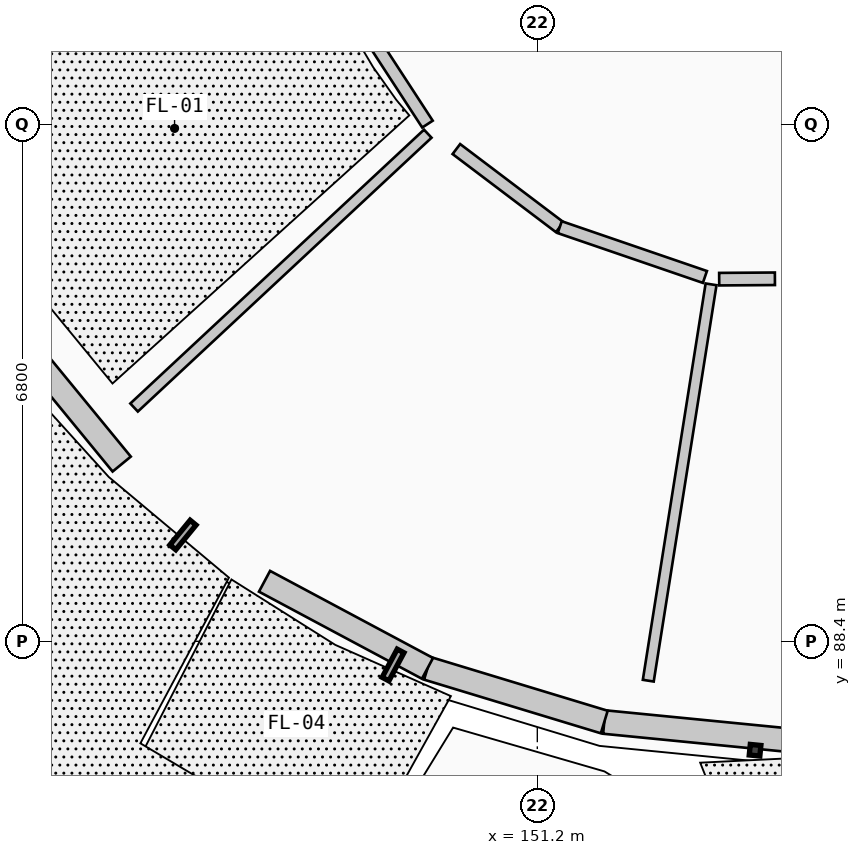
"""IFC4 building model, lengths in metres.
Left out: names, types, materials, properties, quantities, classifications, styles, units other than length and angle.
Written with IfcOpenShell. Run it as: python <this file> out.ifc"""

import sys

from ifc_helpers import new_model, si_unit, direction, frame, frame_2d, origin, origin_2d, place, context, subcontext, project, spatial, rectangle, circle, extrude, element, fill, save


model = new_model("IFC4")
c1 = context("Model", 3, precision=1e-05, world=origin(), true_north=direction((0.0, 1.0)))
c2 = subcontext(c1, "Body", "Model", "MODEL_VIEW")
j1 = project(units=[si_unit("LENGTHUNIT", "METRE"), si_unit("PLANEANGLEUNIT", "RADIAN")], contexts=[c1])
p1 = place(None, origin())
s1 = spatial("IfcSite", under=j1, at=p1, CompositionType="ELEMENT")
p2 = place(p1, origin())
s2 = spatial("IfcBuilding", under=s1, at=p2, CompositionType="ELEMENT")
p3 = place(p2, origin())
s3 = spatial("IfcBuildingStorey", under=s2, at=p3, CompositionType="ELEMENT", Elevation=0.0)
for number, where, z_axis, x_axis in (
    (1, (146.1, 91.1, 0.0), (0.0, 0.0, 1.0), (1.0, 0.0, 0.0)),
    (2, (149.954, 88.524, 0.0), (0.0, 0.0, 1.0), (1.0, 0.0, 0.0)),
    (3, (154.5, 87.62, 0.0), (0.0, 0.0, 1.0), (1.0, 0.0, 0.0)),
):
    element("IfcColumn", number, at=place(p3, frame(where, z_axis=z_axis, x_axis=x_axis)), inside=s3, PredefinedType="PILASTER", context=c2, shape_type="SweptSolid", body=[
        extrude(circle(Radius=0.275, at=origin_2d()), origin(), (0.0, 0.0, 1.0), 4.55),
    ])
for number, where, z_axis, x_axis in (
    (4, (149.975, 94.975, 0.0), (0.0, 0.0, 1.0), (1.0, 0.0, 0.0)),
    (5, (154.5, 93.1, 0.0), (0.0, 0.0, 1.0), (1.0, 0.0, 0.0)),
):
    element("IfcColumn", number, at=place(p3, frame(where, z_axis=z_axis, x_axis=x_axis)), inside=s3, PredefinedType="COLUMN", context=c2, shape_type="SweptSolid", body=[
        extrude(rectangle(XDim=0.365, YDim=0.365, at=origin_2d()), origin(), (0.0, 0.0, 1.0), 4.55),
    ])
p4 = place(p3, frame((150.488, 87.53, 0.0), z_axis=(0.0, 0.0, 1.0), x_axis=(1.0, 0.0, 0.0)))
e6 = element("IfcColumn", 6, at=p4, inside=s3, PredefinedType="PILASTER", context=c2, shape_type="SweptSolid", body=[
    extrude(circle(Radius=0.275, at=origin_2d()), origin(), (0.0, 0.0, 1.0), 4.55),
])
p5 = place(p3, frame((154.5, 87.1, 0.0), z_axis=(0.0, 0.0, 1.0), x_axis=(-0.995202863323, 0.097832820839, 0.0)))
e7 = element("IfcWall", 7, at=p5, inside=s3, PredefinedType="SOLIDWALL", context=c2, shape_type="SweptSolid", body=[
    extrude(rectangle(XDim=2.431, YDim=0.31, at=frame_2d((1.215, 0.0))), origin(), (0.0, 0.0, 1.0), 3.659),
])
p6 = place(p3, frame((152.081, 87.338, 0.0), z_axis=(0.0, 0.0, 1.0), x_axis=(-0.956892539407, 0.290442193951, 0.0)))
e8 = element("IfcWall", 8, at=p6, inside=s3, PredefinedType="SOLIDWALL", context=c2, shape_type="SweptSolid", body=[
    extrude(rectangle(XDim=2.431, YDim=0.31, at=frame_2d((1.215, 0.0))), origin(), (0.0, 0.0, 1.0), 3.659),
])
p7 = place(p3, frame((149.755, 88.044, 0.0), z_axis=(0.0, 0.0, 1.0), x_axis=(-0.881902152415, 0.471432490996, 0.0)))
e9 = element("IfcWall", 9, at=p7, inside=s3, PredefinedType="SOLIDWALL", context=c2, shape_type="SweptSolid", body=[
    extrude(rectangle(XDim=2.431, YDim=0.31, at=frame_2d((1.215, 0.0))), origin(), (0.0, 0.0, 1.0), 3.659),
])
p8 = place(p7, frame((0.516, 0.0, 0.0)))
e10 = element("IfcOpeningElement", 10, at=p8, cuts=e9, PredefinedType="OPENING", context=c2, shape_type="SweptSolid", body=[
    extrude(rectangle(XDim=1.4, YDim=2.3, at=frame_2d((0.7, 1.15))), frame((0.0, 0.165, 0.0), z_axis=(0.0, -1.0, 0.0), x_axis=(1.0, 0.0, 0.0)), (0.0, 0.0, 1.0), 0.33),
])
p9 = place(p3, frame((145.732, 90.732, 0.0), z_axis=(0.0, 0.0, 1.0), x_axis=(-0.634347392822, 0.773048113134, 0.0)))
e11 = element("IfcWall", 11, at=p9, inside=s3, PredefinedType="SOLIDWALL", context=c2, shape_type="SweptSolid", body=[
    extrude(rectangle(XDim=2.431, YDim=0.31, at=frame_2d((1.215, 0.0))), origin(), (0.0, 0.0, 1.0), 3.659),
])
p10 = place(p3, frame((149.759, 95.079, 0.0), z_axis=(0.0, 0.0, 1.0), x_axis=(-0.731374820342, -0.681975712302, 0.0)))
e12 = element("IfcWall", 12, at=p10, inside=s3, PredefinedType="PARTITIONING", context=c2, shape_type="SweptSolid", body=[
    extrude(rectangle(XDim=5.283, YDim=0.145, at=frame_2d((2.642, 0.0))), origin(), (0.0, 0.0, 1.0), 3.634),
])
p11 = place(p3, frame((153.486, 93.097, 0.0), z_axis=(0.0, 0.0, 1.0), x_axis=(-0.156475439167, -0.98768185006, 0.0)))
e13 = element("IfcWall", 13, at=p11, inside=s3, PredefinedType="PARTITIONING", context=c2, shape_type="SweptSolid", body=[
    extrude(rectangle(XDim=5.28, YDim=0.145, at=frame_2d((2.64, 0.0))), origin(), (0.0, 0.0, 1.0), 3.634),
])
p12 = place(p3, frame((148.653, 96.897, 0.0), z_axis=(0.0, 0.0, 1.0), x_axis=(0.545710691365, -0.83797365193, 0.0)))
e14 = element("IfcWall", 14, at=p12, inside=s3, PredefinedType="PARTITIONING", context=c2, shape_type="SweptSolid", body=[
    extrude(rectangle(XDim=2.019, YDim=0.165, at=frame_2d((1.01, 0.0))), origin(), (0.0, 0.0, 1.0), 3.634),
])
p13 = place(p3, frame((150.135, 94.877, 0.0), z_axis=(0.0, 0.0, 1.0), x_axis=(0.797812216317, -0.602906018792, 0.0)))
e15 = element("IfcWall", 15, at=p13, inside=s3, PredefinedType="PARTITIONING", context=c2, shape_type="SweptSolid", body=[
    extrude(rectangle(XDim=1.705, YDim=0.165, at=frame_2d((0.853, 0.0))), origin(), (0.0, 0.0, 1.0), 3.634),
])
p14 = place(p13, frame((0.318, 0.0, 0.0)))
e16 = element("IfcOpeningElement", 16, at=p14, cuts=e15, PredefinedType="OPENING", context=c2, shape_type="SweptSolid", body=[
    extrude(rectangle(XDim=1.07, YDim=2.2, at=frame_2d((0.535, 1.1))), frame((0.0, 0.093, 0.0), z_axis=(0.0, -1.0, 0.0), x_axis=(1.0, 0.0, 0.0)), (0.0, 0.0, 1.0), 0.185),
])
p15 = place(p3, frame((151.495, 93.849, 0.0), z_axis=(0.0, 0.0, 1.0), x_axis=(0.94591520518, -0.324413971046, 0.0)))
e17 = element("IfcWall", 17, at=p15, inside=s3, PredefinedType="PARTITIONING", context=c2, shape_type="SweptSolid", body=[
    extrude(rectangle(XDim=2.019, YDim=0.165, at=frame_2d((1.01, 0.0))), origin(), (0.0, 0.0, 1.0), 3.634),
])
p16 = place(p3, frame((153.593, 93.165, 0.0), z_axis=(0.0, 0.0, 1.0), x_axis=(0.999977808117, 0.006662077336, 0.0)))
e18 = element("IfcWall", 18, at=p16, inside=s3, PredefinedType="PARTITIONING", context=c2, shape_type="SweptSolid", body=[
    extrude(rectangle(XDim=0.733, YDim=0.165, at=frame_2d((0.366, 0.0))), origin(), (0.0, 0.0, 1.0), 3.634),
])
p17 = place(p8, origin())
e19 = element("IfcDoor", 19, at=p17, inside=s3, OperationType="SINGLE_SWING_LEFT", PredefinedType="DOOR", context=c2, shape_type="SweptSolid", body=[
    extrude(rectangle(XDim=1.4, YDim=2.3, at=frame_2d((0.7, 1.15))), frame((0.0, 0.025, 0.0), z_axis=(0.0, -1.0, 0.0), x_axis=(1.0, 0.0, 0.0)), (0.0, 0.0, 1.0), 0.05),
])
fill(e10, e19)
p18 = place(p14, origin())
e20 = element("IfcDoor", 20, at=p18, inside=s3, OperationType="SINGLE_SWING_LEFT", PredefinedType="DOOR", context=c2, shape_type="SweptSolid", body=[
    extrude(rectangle(XDim=1.07, YDim=2.2, at=frame_2d((0.535, 1.1))), frame((0.0, 0.025, 0.0), z_axis=(0.0, -1.0, 0.0), x_axis=(1.0, 0.0, 0.0)), (0.0, 0.0, 1.0), 0.05),
])
fill(e16, e20)
save(model, sys.argv[1])
